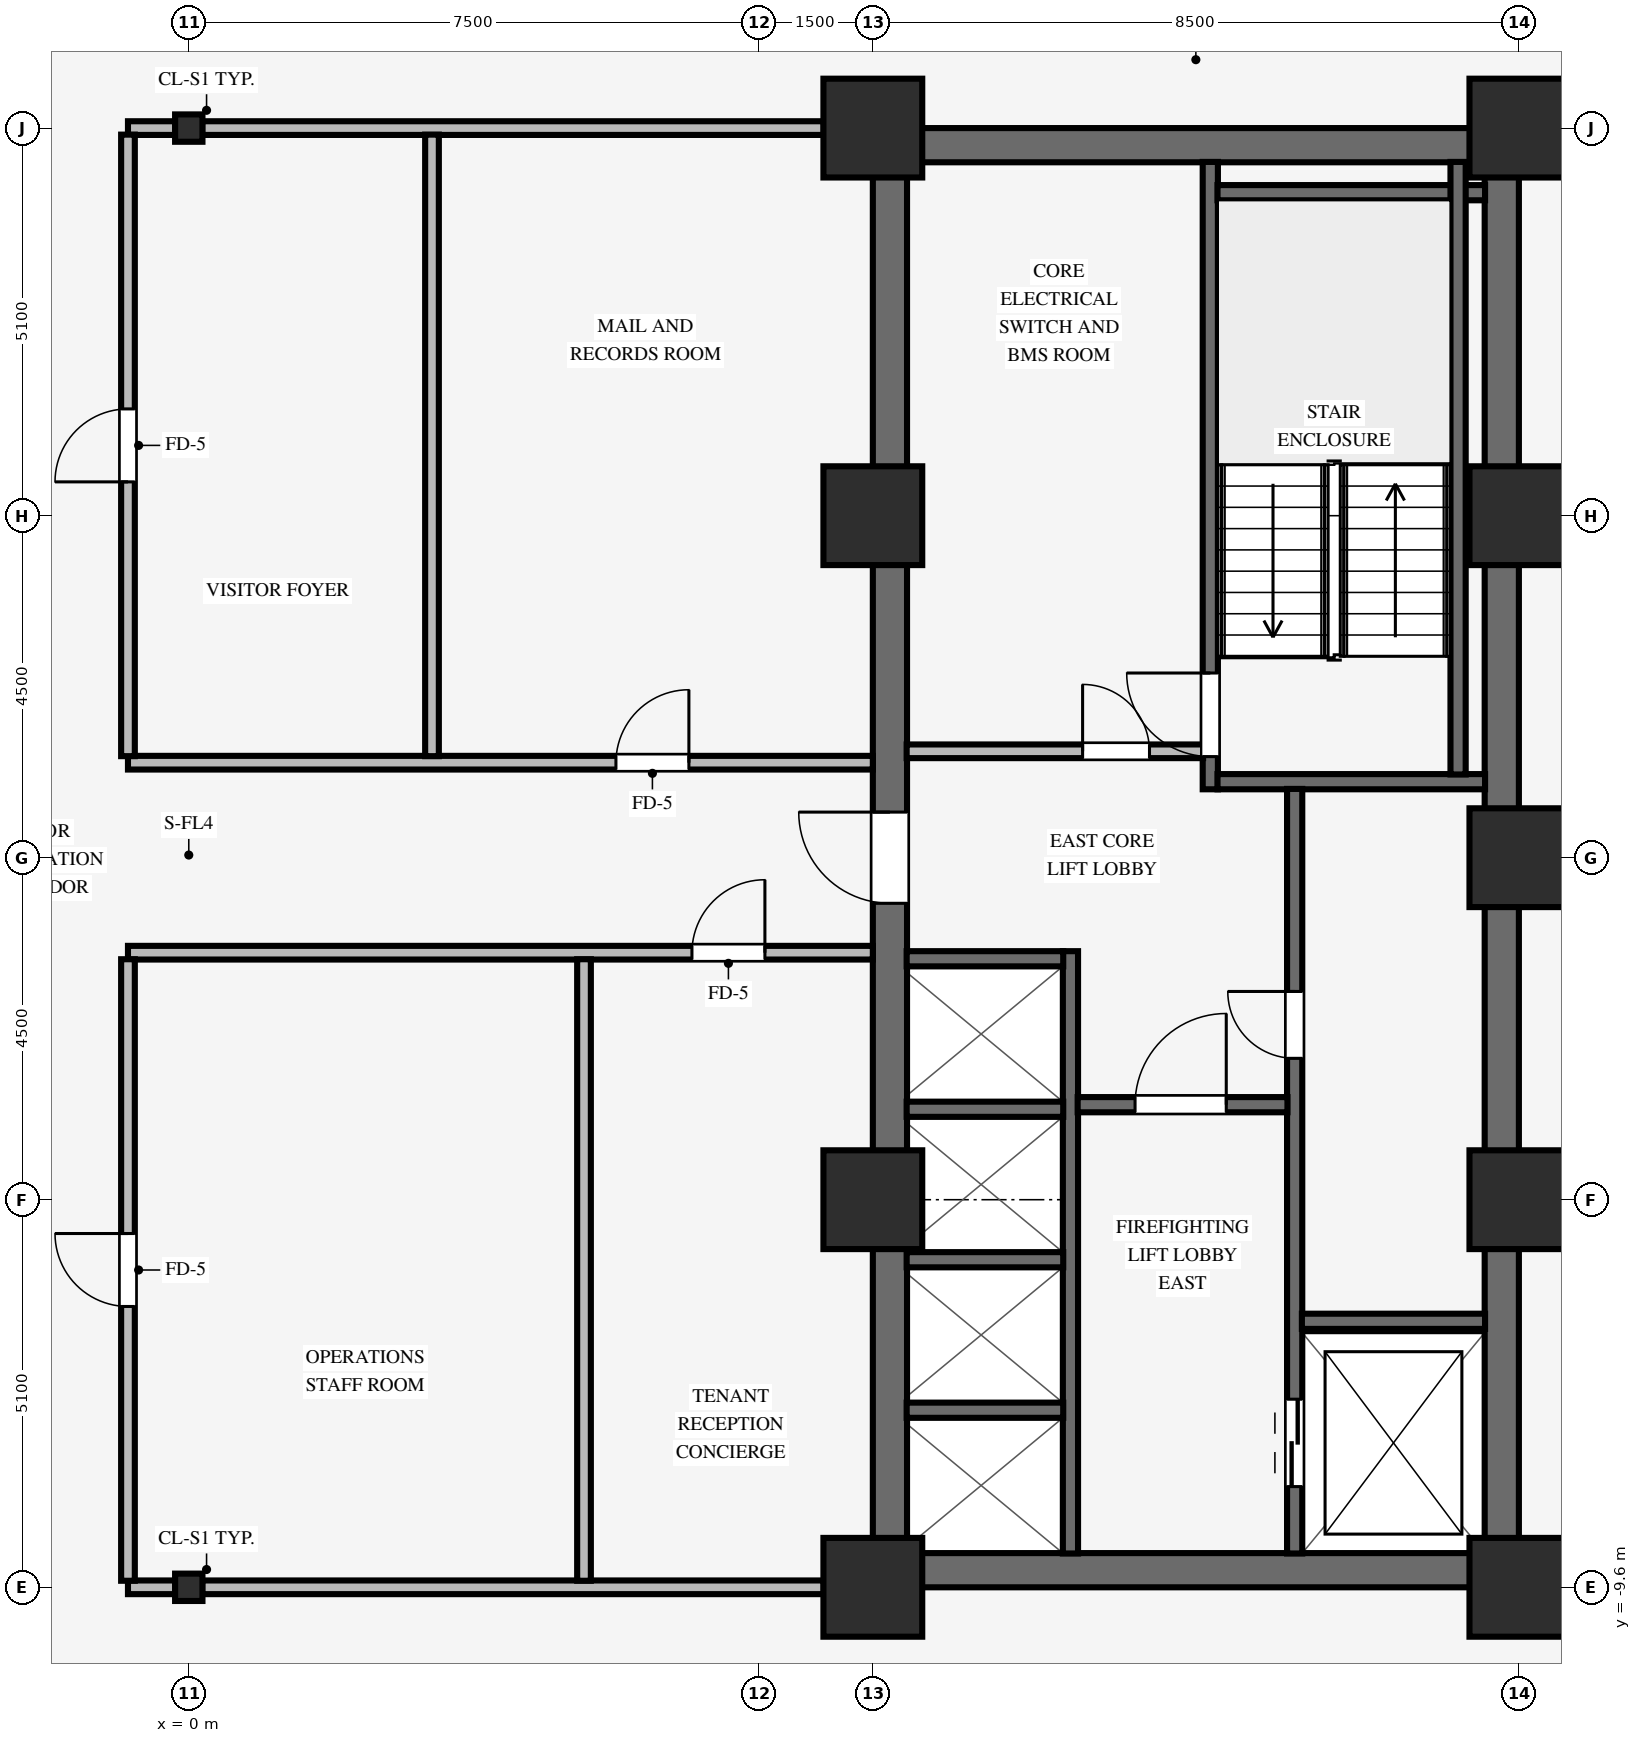
"""IFC4 building model, lengths in metres.
Left out: names, types, materials, properties, quantities, classifications, styles, units other than length and angle.
Written with IfcOpenShell. Run it as: python <this file> out.ifc"""

import sys

from ifc_helpers import new_model, si_unit, direction, frame, frame_2d, origin, origin_2d, place, context, subcontext, project, spatial, rectangle, i_section, extrude, source, transform, mapped, element, fill, save


model = new_model("IFC4")
c1 = context("Model", 3, precision=1e-05, world=origin(), true_north=direction((0.0, 1.0)))
c2 = subcontext(c1, "Body", "Model", "MODEL_VIEW")
j1 = project(units=[si_unit("LENGTHUNIT", "METRE"), si_unit("PLANEANGLEUNIT", "RADIAN")], contexts=[c1])
p1 = place(None, origin())
s1 = spatial("IfcSite", under=j1, at=p1, CompositionType="ELEMENT")
p2 = place(p1, origin())
s2 = spatial("IfcBuilding", under=s1, at=p2, CompositionType="ELEMENT")
p3 = place(p2, frame((0.0, 0.0, 53.15)))
s3 = spatial("IfcBuildingStorey", under=s2, at=p3, CompositionType="ELEMENT", Elevation=53.15)
for number, where, z_axis, x_axis in (
    (1, (9.0, -9.375, 0.0), (0.0, 0.0, 1.0), (1.0, 0.0, 0.0)),
    (2, (9.0, 9.375, 0.0), (0.0, 0.0, 1.0), (1.0, 0.0, 0.0)),
):
    element("IfcWall", number, at=place(p3, frame(where, z_axis=z_axis, x_axis=x_axis)), inside=s3, PredefinedType="SHEAR", context=c2, shape_type="SweptSolid", body=[
        extrude(rectangle(XDim=8.5, YDim=0.45, at=frame_2d((4.25, 0.0))), origin(), (0.0, 0.0, 1.0), 3.25),
    ])
p4 = place(p3, frame((9.225, -9.155, 0.0), z_axis=(0.0, 0.0, 1.0), x_axis=(0.0, 1.0, 0.0)))
e3 = element("IfcWall", 3, at=p4, inside=s3, PredefinedType="SHEAR", context=c2, shape_type="SweptSolid", body=[
    extrude(rectangle(XDim=18.31, YDim=0.45, at=frame_2d((9.155, 0.0))), origin(), (0.0, 0.0, 1.0), 3.25),
])
p5 = place(p4, frame((8.555, 0.0, 0.0)))
e4 = element("IfcOpeningElement", 4, at=p5, cuts=e3, PredefinedType="OPENING", context=c2, shape_type="SweptSolid", body=[
    extrude(rectangle(XDim=1.2, YDim=2.15, at=frame_2d((0.6, 1.075))), frame((0.0, 0.235, 0.0), z_axis=(0.0, -1.0, 0.0), x_axis=(1.0, 0.0, 0.0)), (0.0, 0.0, 1.0), 0.47),
])
p6 = place(p3, frame((17.275, -9.155, 0.0), z_axis=(0.0, 0.0, 1.0), x_axis=(0.0, 1.0, 0.0)))
e5 = element("IfcWall", 5, at=p6, inside=s3, PredefinedType="SHEAR", context=c2, shape_type="SweptSolid", body=[
    extrude(rectangle(XDim=18.31, YDim=0.45, at=frame_2d((9.155, 0.0))), origin(), (0.0, 0.0, 1.0), 3.25),
])
for number, where, z_axis, x_axis in (
    (6, (9.0, -9.6, 0.0), (0.0, 0.0, 1.0), (1.0, 0.0, 0.0)),
    (7, (9.0, -4.5, 0.0), (0.0, 0.0, 1.0), (1.0, 0.0, 0.0)),
    (8, (9.0, 4.5, 0.0), (0.0, 0.0, 1.0), (1.0, 0.0, 0.0)),
    (9, (9.0, 9.6, 0.0), (0.0, 0.0, 1.0), (1.0, 0.0, 0.0)),
    (10, (17.5, -9.6, 0.0), (0.0, 0.0, 1.0), (1.0, 0.0, 0.0)),
    (11, (17.5, -4.5, 0.0), (0.0, 0.0, 1.0), (1.0, 0.0, 0.0)),
    (12, (17.5, 4.5, 0.0), (0.0, 0.0, 1.0), (1.0, 0.0, 0.0)),
    (13, (17.5, 9.6, 0.0), (0.0, 0.0, 1.0), (1.0, 0.0, 0.0)),
    (14, (17.5, 0.0, 0.0), (0.0, 0.0, 1.0), (1.0, 0.0, 0.0)),
):
    element("IfcColumn", number, at=place(p3, frame(where, z_axis=z_axis, x_axis=x_axis)), inside=s3, PredefinedType="COLUMN", context=c2, shape_type="SweptSolid", body=[
        extrude(rectangle(XDim=1.3, YDim=1.3, at=origin_2d()), origin(), (0.0, 0.0, 1.0), 3.25),
    ])
for number, where, z_axis, x_axis in (
    (15, (0.0, -9.6, 0.0), (0.0, 0.0, 1.0), (1.0, 0.0, 0.0)),
    (16, (0.0, 9.6, 0.0), (0.0, 0.0, 1.0), (1.0, 0.0, 0.0)),
):
    element("IfcColumn", number, at=place(p3, frame(where, z_axis=z_axis, x_axis=x_axis)), inside=s3, PredefinedType="COLUMN", context=c2, shape_type="SweptSolid", body=[
        extrude(i_section(OverallWidth=0.36, OverallDepth=0.36, WebThickness=0.021, FlangeThickness=0.021, FilletRadius=0.018, at=origin_2d()), origin(), (0.0, 0.0, 1.0), 3.25),
    ])
p7 = place(p3, frame((13.44, 0.9, 0.0), z_axis=(0.0, 0.0, 1.0), x_axis=(0.0, 1.0, 0.0)))
e17 = element("IfcWall", 17, at=p7, inside=s3, PredefinedType="SHEAR", context=c2, shape_type="SweptSolid", body=[
    extrude(rectangle(XDim=8.255, YDim=0.2, at=frame_2d((4.127, 0.0))), origin(), (0.0, 0.0, 1.0), 3.25),
])
p8 = place(p7, frame((0.43, 0.0, 0.0)))
e18 = element("IfcOpeningElement", 18, at=p8, cuts=e17, PredefinedType="OPENING", context=c2, shape_type="SweptSolid", body=[
    extrude(rectangle(XDim=1.1, YDim=2.15, at=frame_2d((0.55, 1.075))), frame((0.0, 0.11, 0.0), z_axis=(0.0, -1.0, 0.0), x_axis=(1.0, 0.0, 0.0)), (0.0, 0.0, 1.0), 0.22),
])
for number, where, z_axis, x_axis in (
    (19, (13.535, 1.0, 0.0), (0.0, 0.0, 1.0), (1.0, 0.0, 0.0)),
    (20, (13.535, 8.75, 0.0), (0.0, 0.0, 1.0), (1.0, 0.0, 0.0)),
):
    element("IfcWall", number, at=place(p3, frame(where, z_axis=z_axis, x_axis=x_axis)), inside=s3, PredefinedType="SHEAR", context=c2, shape_type="SweptSolid", body=[
        extrude(rectangle(XDim=3.52, YDim=0.2, at=frame_2d((1.76, 0.0))), origin(), (0.0, 0.0, 1.0), 3.25),
    ])
p9 = place(p3, frame((16.7, 1.095, 0.0), z_axis=(0.0, 0.0, 1.0), x_axis=(0.0, 1.0, 0.0)))
e21 = element("IfcWall", 21, at=p9, inside=s3, PredefinedType="SHEAR", context=c2, shape_type="SweptSolid", body=[
    extrude(rectangle(XDim=8.06, YDim=0.2, at=frame_2d((4.03, 0.0))), origin(), (0.0, 0.0, 1.0), 3.25),
])
p10 = place(p3, frame((14.55, -9.155, 0.0), z_axis=(0.0, 0.0, 1.0), x_axis=(0.0, 1.0, 0.0)))
e22 = element("IfcWall", 22, at=p10, inside=s3, PredefinedType="SHEAR", context=c2, shape_type="SweptSolid", body=[
    extrude(rectangle(XDim=10.06, YDim=0.2, at=frame_2d((5.03, 0.0))), origin(), (0.0, 0.0, 1.0), 3.25),
])
p11 = place(p10, frame((6.515, 0.0, 0.0)))
e23 = element("IfcOpeningElement", 23, at=p11, cuts=e22, PredefinedType="OPENING", context=c2, shape_type="SweptSolid", body=[
    extrude(rectangle(XDim=0.88, YDim=2.1, at=frame_2d((0.44, 1.05))), frame((0.0, 0.11, 0.0), z_axis=(0.0, -1.0, 0.0), x_axis=(1.0, 0.0, 0.0)), (0.0, 0.0, 1.0), 0.22),
])
p12 = place(p10, frame((0.88, 0.0, 0.0)))
e24 = element("IfcOpeningElement", 24, at=p12, cuts=e22, PredefinedType="OPENING", context=c2, shape_type="SweptSolid", body=[
    extrude(rectangle(XDim=1.15, YDim=2.15, at=frame_2d((0.575, 1.075))), frame((0.0, 0.11, 0.0), z_axis=(0.0, -1.0, 0.0), x_axis=(1.0, 0.0, 0.0)), (0.0, 0.0, 1.0), 0.22),
])
p13 = place(p3, frame((14.645, -6.1, 0.0), z_axis=(0.0, 0.0, 1.0), x_axis=(1.0, 0.0, 0.0)))
e25 = element("IfcWall", 25, at=p13, inside=s3, PredefinedType="SHEAR", context=c2, shape_type="SweptSolid", body=[
    extrude(rectangle(XDim=2.41, YDim=0.2, at=frame_2d((1.205, 0.0))), origin(), (0.0, 0.0, 1.0), 3.25),
])
p14 = place(p3, frame((11.6, -9.155, 0.0), z_axis=(0.0, 0.0, 1.0), x_axis=(0.0, 1.0, 0.0)))
e26 = element("IfcWall", 26, at=p14, inside=s3, PredefinedType="SHEAR", context=c2, shape_type="SweptSolid", body=[
    extrude(rectangle(XDim=7.925, YDim=0.2, at=frame_2d((3.962, 0.0))), origin(), (0.0, 0.0, 1.0), 3.25),
])
p15 = place(p3, frame((11.695, -3.25, 0.0), z_axis=(0.0, 0.0, 1.0), x_axis=(1.0, 0.0, 0.0)))
e27 = element("IfcWall", 27, at=p15, inside=s3, PredefinedType="SHEAR", context=c2, shape_type="SweptSolid", body=[
    extrude(rectangle(XDim=2.76, YDim=0.2, at=frame_2d((1.38, 0.0))), origin(), (0.0, 0.0, 1.0), 3.25),
])
p16 = place(p15, frame((0.755, 0.0, 0.0)))
e28 = element("IfcOpeningElement", 28, at=p16, cuts=e27, PredefinedType="OPENING", context=c2, shape_type="SweptSolid", body=[
    extrude(rectangle(XDim=1.2, YDim=2.15, at=frame_2d((0.6, 1.075))), frame((0.0, 0.11, 0.0), z_axis=(0.0, -1.0, 0.0), x_axis=(1.0, 0.0, 0.0)), (0.0, 0.0, 1.0), 0.22),
])
for number, where, z_axis, x_axis in (
    (29, (9.445, -7.27, 0.0), (0.0, 0.0, 1.0), (1.0, 0.0, 0.0)),
    (30, (9.445, -5.29, 0.0), (0.0, 0.0, 1.0), (1.0, 0.0, 0.0)),
    (31, (9.445, -3.31, 0.0), (0.0, 0.0, 1.0), (1.0, 0.0, 0.0)),
    (32, (9.445, -1.33, 0.0), (0.0, 0.0, 1.0), (1.0, 0.0, 0.0)),
):
    element("IfcWall", number, at=place(p3, frame(where, z_axis=z_axis, x_axis=x_axis)), inside=s3, PredefinedType="SHEAR", context=c2, shape_type="SweptSolid", body=[
        extrude(rectangle(XDim=2.06, YDim=0.2, at=frame_2d((1.03, 0.0))), origin(), (0.0, 0.0, 1.0), 3.25),
    ])
p17 = place(p3, frame((9.445, 1.4, 0.0), z_axis=(0.0, 0.0, 1.0), x_axis=(1.0, 0.0, 0.0)))
e33 = element("IfcWall", 33, at=p17, inside=s3, PredefinedType="PARTITIONING", context=c2, shape_type="SweptSolid", body=[
    extrude(rectangle(XDim=3.9, YDim=0.18, at=frame_2d((1.95, 0.0))), origin(), (0.0, 0.0, 1.0), 3.24),
])
p18 = place(p17, frame((2.315, 0.0, 0.0)))
e34 = element("IfcOpeningElement", 34, at=p18, cuts=e33, PredefinedType="OPENING", context=c2, shape_type="SweptSolid", body=[
    extrude(rectangle(XDim=0.88, YDim=2.1, at=frame_2d((0.44, 1.05))), frame((0.0, 0.1, 0.0), z_axis=(0.0, -1.0, 0.0), x_axis=(1.0, 0.0, 0.0)), (0.0, 0.0, 1.0), 0.2),
])
p19 = place(p3, frame((-0.8, -9.6, 0.0), z_axis=(0.0, 0.0, 1.0), x_axis=(1.0, 0.0, 0.0)))
e35 = element("IfcWall", 35, at=p19, inside=s3, PredefinedType="PARTITIONING", context=c2, shape_type="SweptSolid", body=[
    extrude(rectangle(XDim=0.624, YDim=0.18, at=frame_2d((0.312, 0.0))), origin(), (0.0, 0.0, 1.0), 2.285),
])
p20 = place(p3, frame((0.176, -9.6, 0.0), z_axis=(0.0, 0.0, 1.0), x_axis=(1.0, 0.0, 0.0)))
e36 = element("IfcWall", 36, at=p20, inside=s3, PredefinedType="PARTITIONING", context=c2, shape_type="SweptSolid", body=[
    extrude(rectangle(XDim=8.178, YDim=0.18, at=frame_2d((4.089, 0.0))), origin(), (0.0, 0.0, 1.0), 2.285),
])
p21 = place(p3, frame((-0.8, -1.25, 0.0), z_axis=(0.0, 0.0, 1.0), x_axis=(1.0, 0.0, 0.0)))
e37 = element("IfcWall", 37, at=p21, inside=s3, PredefinedType="PARTITIONING", context=c2, shape_type="SweptSolid", body=[
    extrude(rectangle(XDim=9.8, YDim=0.18, at=frame_2d((4.9, 0.0))), origin(), (0.0, 0.0, 1.0), 3.24),
])
p22 = place(p21, frame((7.42, 0.0, 0.0)))
e38 = element("IfcOpeningElement", 38, at=p22, cuts=e37, PredefinedType="OPENING", context=c2, shape_type="SweptSolid", body=[
    extrude(rectangle(XDim=0.96, YDim=2.1, at=frame_2d((0.48, 1.05))), frame((0.0, 0.1, 0.0), z_axis=(0.0, -1.0, 0.0), x_axis=(1.0, 0.0, 0.0)), (0.0, 0.0, 1.0), 0.2),
])
p23 = place(p3, frame((-0.8, 1.25, 0.0), z_axis=(0.0, 0.0, 1.0), x_axis=(1.0, 0.0, 0.0)))
e39 = element("IfcWall", 39, at=p23, inside=s3, PredefinedType="PARTITIONING", context=c2, shape_type="SweptSolid", body=[
    extrude(rectangle(XDim=9.8, YDim=0.18, at=frame_2d((4.9, 0.0))), origin(), (0.0, 0.0, 1.0), 3.24),
])
p24 = place(p23, frame((6.42, 0.0, 0.0)))
e40 = element("IfcOpeningElement", 40, at=p24, cuts=e39, PredefinedType="OPENING", context=c2, shape_type="SweptSolid", body=[
    extrude(rectangle(XDim=0.96, YDim=2.1, at=frame_2d((0.48, 1.05))), frame((0.0, 0.1, 0.0), z_axis=(0.0, -1.0, 0.0), x_axis=(1.0, 0.0, 0.0)), (0.0, 0.0, 1.0), 0.2),
])
p25 = place(p3, frame((-0.8, 9.6, 0.0), z_axis=(0.0, 0.0, 1.0), x_axis=(1.0, 0.0, 0.0)))
e41 = element("IfcWall", 41, at=p25, inside=s3, PredefinedType="PARTITIONING", context=c2, shape_type="SweptSolid", body=[
    extrude(rectangle(XDim=0.624, YDim=0.18, at=frame_2d((0.312, 0.0))), origin(), (0.0, 0.0, 1.0), 2.285),
])
p26 = place(p3, frame((0.176, 9.6, 0.0), z_axis=(0.0, 0.0, 1.0), x_axis=(1.0, 0.0, 0.0)))
e42 = element("IfcWall", 42, at=p26, inside=s3, PredefinedType="PARTITIONING", context=c2, shape_type="SweptSolid", body=[
    extrude(rectangle(XDim=8.178, YDim=0.18, at=frame_2d((4.089, 0.0))), origin(), (0.0, 0.0, 1.0), 2.285),
])
p27 = place(p3, frame((-0.8, -9.514, 0.0), z_axis=(0.0, 0.0, 1.0), x_axis=(0.0, 1.0, 0.0)))
e43 = element("IfcWall", 43, at=p27, inside=s3, PredefinedType="PARTITIONING", context=c2, shape_type="SweptSolid", body=[
    extrude(rectangle(XDim=8.178, YDim=0.18, at=frame_2d((4.089, 0.0))), origin(), (0.0, 0.0, 1.0), 3.24),
])
p28 = place(p27, frame((3.609, 0.0, 0.0)))
e44 = element("IfcOpeningElement", 44, at=p28, cuts=e43, PredefinedType="OPENING", context=c2, shape_type="SweptSolid", body=[
    extrude(rectangle(XDim=0.96, YDim=2.1, at=frame_2d((0.48, 1.05))), frame((0.0, 0.1, 0.0), z_axis=(0.0, -1.0, 0.0), x_axis=(1.0, 0.0, 0.0)), (0.0, 0.0, 1.0), 0.2),
])
p29 = place(p3, frame((-0.8, 1.336, 0.0), z_axis=(0.0, 0.0, 1.0), x_axis=(0.0, 1.0, 0.0)))
e45 = element("IfcWall", 45, at=p29, inside=s3, PredefinedType="PARTITIONING", context=c2, shape_type="SweptSolid", body=[
    extrude(rectangle(XDim=8.178, YDim=0.18, at=frame_2d((4.089, 0.0))), origin(), (0.0, 0.0, 1.0), 3.24),
])
p30 = place(p29, frame((3.609, 0.0, 0.0)))
e46 = element("IfcOpeningElement", 46, at=p30, cuts=e45, PredefinedType="OPENING", context=c2, shape_type="SweptSolid", body=[
    extrude(rectangle(XDim=0.96, YDim=2.1, at=frame_2d((0.48, 1.05))), frame((0.0, 0.1, 0.0), z_axis=(0.0, -1.0, 0.0), x_axis=(1.0, 0.0, 0.0)), (0.0, 0.0, 1.0), 0.2),
])
for number, where, z_axis, x_axis in (
    (47, (3.2, 1.336, 0.0), (0.0, 0.0, 1.0), (0.0, 1.0, 0.0)),
    (48, (5.2, -9.514, 0.0), (0.0, 0.0, 1.0), (0.0, 1.0, 0.0)),
):
    element("IfcWall", number, at=place(p3, frame(where, z_axis=z_axis, x_axis=x_axis)), inside=s3, PredefinedType="PARTITIONING", context=c2, shape_type="SweptSolid", body=[
        extrude(rectangle(XDim=8.178, YDim=0.18, at=frame_2d((4.089, 0.0))), origin(), (0.0, 0.0, 1.0), 3.24),
    ])
m1 = source(origin(), c2, "Body", "SweptSolid", [
    extrude(rectangle(XDim=1.1, YDim=2.15, at=frame_2d((0.55, 1.075))), frame((0.0, 0.025, 0.0), z_axis=(0.0, -1.0, 0.0), x_axis=(1.0, 0.0, 0.0)), (0.0, 0.0, 1.0), 0.05),
])
p31 = place(p8, origin())
e49 = element("IfcDoor", 49, at=p31, inside=s3, OperationType="SINGLE_SWING_RIGHT", PredefinedType="DOOR", context=c2, shape_type="MappedRepresentation", body=[
    mapped(m1, transform((0.0, 0.0, 0.0), scale=1.0)),
])
fill(e18, e49)
m2 = source(origin(), c2, "Body", "SweptSolid", [
    extrude(rectangle(XDim=0.88, YDim=2.1, at=frame_2d((0.44, 1.05))), frame((0.0, 0.025, 0.0), z_axis=(0.0, -1.0, 0.0), x_axis=(1.0, 0.0, 0.0)), (0.0, 0.0, 1.0), 0.05),
])
p32 = place(p11, origin())
e50 = element("IfcDoor", 50, at=p32, inside=s3, OperationType="SINGLE_SWING_RIGHT", PredefinedType="DOOR", context=c2, shape_type="MappedRepresentation", body=[
    mapped(m2, transform((0.0, 0.0, 0.0), scale=1.0)),
])
fill(e23, e50)
m3 = source(origin(), c2, "Body", "SweptSolid", [
    extrude(rectangle(XDim=1.2, YDim=2.15, at=frame_2d((0.6, 1.075))), frame((0.0, 0.025, 0.0), z_axis=(0.0, -1.0, 0.0), x_axis=(1.0, 0.0, 0.0)), (0.0, 0.0, 1.0), 0.05),
])
p33 = place(p16, origin())
e51 = element("IfcDoor", 51, at=p33, inside=s3, OperationType="SINGLE_SWING_RIGHT", PredefinedType="DOOR", context=c2, shape_type="MappedRepresentation", body=[
    mapped(m3, transform((0.0, 0.0, 0.0), scale=1.0)),
])
fill(e28, e51)
p34 = place(p5, origin())
e52 = element("IfcDoor", 52, at=p34, inside=s3, OperationType="SINGLE_SWING_RIGHT", PredefinedType="DOOR", context=c2, shape_type="MappedRepresentation", body=[
    mapped(m3, transform((0.0, 0.0, 0.0), scale=1.0)),
])
fill(e4, e52)
p35 = place(p18, origin())
e53 = element("IfcDoor", 53, at=p35, inside=s3, OperationType="SINGLE_SWING_LEFT", PredefinedType="DOOR", context=c2, shape_type="MappedRepresentation", body=[
    mapped(m2, transform((0.0, 0.0, 0.0), scale=1.0)),
])
fill(e34, e53)
m4 = source(origin(), c2, "Body", "SweptSolid", [
    extrude(rectangle(XDim=1.15, YDim=2.15, at=frame_2d((0.575, 1.075))), frame((0.0, 0.025, 0.0), z_axis=(0.0, -1.0, 0.0), x_axis=(1.0, 0.0, 0.0)), (0.0, 0.0, 1.0), 0.05),
])
p36 = place(p12, origin())
e54 = element("IfcDoor", 54, at=p36, inside=s3, OperationType="DOUBLE_DOOR_SLIDING", PredefinedType="DOOR", context=c2, shape_type="MappedRepresentation", body=[
    mapped(m4, transform((0.0, 0.0, 0.0), scale=1.0)),
])
fill(e24, e54)
m5 = source(origin(), c2, "Body", "SweptSolid", [
    extrude(rectangle(XDim=0.96, YDim=2.1, at=frame_2d((0.48, 1.05))), frame((0.0, 0.025, 0.0), z_axis=(0.0, -1.0, 0.0), x_axis=(1.0, 0.0, 0.0)), (0.0, 0.0, 1.0), 0.05),
])
p37 = place(p30, origin())
e55 = element("IfcDoor", 55, at=p37, inside=s3, OperationType="SINGLE_SWING_LEFT", PredefinedType="DOOR", context=c2, shape_type="MappedRepresentation", body=[
    mapped(m5, transform((0.0, 0.0, 0.0), scale=1.0)),
])
fill(e46, e55)
p38 = place(p28, origin())
e56 = element("IfcDoor", 56, at=p38, inside=s3, OperationType="SINGLE_SWING_RIGHT", PredefinedType="DOOR", context=c2, shape_type="MappedRepresentation", body=[
    mapped(m5, transform((0.0, 0.0, 0.0), scale=1.0)),
])
fill(e44, e56)
p39 = place(p24, origin())
e57 = element("IfcDoor", 57, at=p39, inside=s3, OperationType="SINGLE_SWING_RIGHT", PredefinedType="DOOR", context=c2, shape_type="MappedRepresentation", body=[
    mapped(m5, transform((0.0, 0.0, 0.0), scale=1.0)),
])
fill(e40, e57)
p40 = place(p22, origin())
e58 = element("IfcDoor", 58, at=p40, inside=s3, OperationType="SINGLE_SWING_RIGHT", PredefinedType="DOOR", context=c2, shape_type="MappedRepresentation", body=[
    mapped(m5, transform((0.0, 0.0, 0.0), scale=1.0)),
])
fill(e38, e58)
save(model, sys.argv[1])
